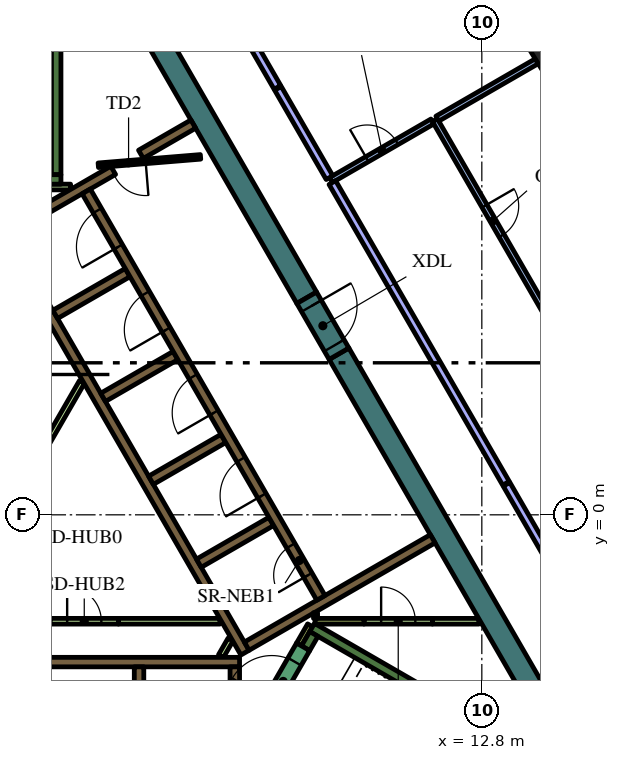
"""IFC4 building model, lengths in metres.
Left out: names, types, materials, properties, quantities, classifications, styles, units other than length and angle.
Written with IfcOpenShell. Run it as: python <this file> out.ifc"""

import sys

from ifc_helpers import new_model, si_unit, direction, frame, frame_2d, origin, origin_2d, place, context, subcontext, project, spatial, polyline, rectangle, outline, extrude, element, fill, save


model = new_model("IFC4")
c1 = context("Model", 3, precision=1e-05, world=origin(), true_north=direction((0.0, 1.0)))
c2 = subcontext(c1, "Body", "Model", "MODEL_VIEW")
j1 = project(units=[si_unit("LENGTHUNIT", "METRE"), si_unit("PLANEANGLEUNIT", "RADIAN")], contexts=[c1])
p1 = place(None, origin())
s1 = spatial("IfcSite", under=j1, at=p1, CompositionType="ELEMENT")
p2 = place(p1, origin())
s2 = spatial("IfcBuilding", under=s1, at=p2, CompositionType="ELEMENT")
p3 = place(p2, frame((0.0, 0.0, 288.0)))
s3 = spatial("IfcBuildingStorey", under=s2, at=p3, CompositionType="ELEMENT", Elevation=288.0)
p4 = place(p3, frame((14.556, 12.098, 0.0), z_axis=(0.0, 0.0, 1.0), x_axis=(-0.525609744083, 0.850725805959, 0.0)))
e1 = element("IfcColumn", 1, at=p4, inside=s3, PredefinedType="COLUMN", context=c2, shape_type="SweptSolid", body=[
    extrude(rectangle(XDim=1.0, YDim=0.7, at=origin_2d()), origin(), (0.0, 0.0, 1.0), 4.2),
])
for number, where, z_axis, x_axis in (
    (2, (9.042, 4.239, 0.0), (0.0, 0.0, 1.0), (0.5, -0.866, 0.0)),
    (3, (1.989, 16.456, 0.0), (0.0, 0.0, 1.0), (0.5, -0.866, 0.0)),
):
    element("IfcWall", number, at=place(p3, frame(where, z_axis=z_axis, x_axis=x_axis)), inside=s3, PredefinedType="SOLIDWALL", context=c2, shape_type="SweptSolid", body=[
        extrude(rectangle(XDim=12.406, YDim=0.6, at=frame_2d((6.203, 0.0))), origin(), (0.0, 0.0, 1.0), 4.2),
    ])
p5 = place(p3, frame((8.334, -2.964, 0.0), z_axis=(0.0, 0.0, 1.0), x_axis=(0.866016039709, -0.500016218704, 0.0)))
e4 = element("IfcWall", 4, at=p5, inside=s3, PredefinedType="SOLIDWALL", context=c2, shape_type="SweptSolid", body=[
    extrude(rectangle(XDim=7.05, YDim=0.25, at=frame_2d((3.525, 0.0))), origin(), (0.0, 0.0, 1.0), 4.2),
])
p6 = place(p3, frame((8.163, -3.511, 0.0), z_axis=(0.0, 0.0, 1.0), x_axis=(0.500127794843, 0.865951608824, 0.0)))
e5 = element("IfcWall", 5, at=p6, inside=s3, PredefinedType="SOLIDWALL", context=c2, shape_type="SweptSolid", body=[
    extrude(rectangle(XDim=0.435, YDim=0.25, at=frame_2d((0.217, 0.0))), origin(), (0.0, 0.0, 1.0), 4.2),
])
p7 = place(p3, frame((1.6, 8.95, 0.0), z_axis=(0.0, 0.0, 1.0), x_axis=(0.0, 1.0, 0.0)))
e6 = element("IfcWall", 6, at=p7, inside=s3, PredefinedType="SOLIDWALL", context=c2, shape_type="SweptSolid", body=[
    extrude(rectangle(XDim=6.8, YDim=0.25, at=frame_2d((3.4, 0.0))), origin(), (0.0, 0.0, 1.0), 4.2),
])
p8 = place(p3, frame((1.05, 8.825, 0.0), z_axis=(0.0, 0.0, 1.0), x_axis=(1.0, 0.0, 0.0)))
e7 = element("IfcWall", 7, at=p8, inside=s3, PredefinedType="SOLIDWALL", context=c2, shape_type="SweptSolid", body=[
    extrude(rectangle(XDim=0.675, YDim=0.25, at=frame_2d((0.337, 0.0))), origin(), (0.0, 0.0, 1.0), 4.2),
])
p9 = place(p3, frame((-5.806, -3.875, 0.0), z_axis=(0.0, 0.0, 1.0), x_axis=(1.0, 0.0, 0.0)))
e8 = element("IfcWall", 8, at=p9, inside=s3, PredefinedType="SOLIDWALL", context=c2, shape_type="SweptSolid", body=[
    extrude(rectangle(XDim=12.231, YDim=0.25, at=frame_2d((6.116, 0.0))), origin(), (0.0, 0.0, 1.0), 4.2),
])
p10 = place(p3, frame((6.3, -7.24, 0.0), z_axis=(0.0, 0.0, 1.0), x_axis=(0.0, 1.0, 0.0)))
e9 = element("IfcWall", 9, at=p10, inside=s3, PredefinedType="SOLIDWALL", context=c2, shape_type="SweptSolid", body=[
    extrude(rectangle(XDim=3.24, YDim=0.25, at=frame_2d((1.62, 0.0))), origin(), (0.0, 0.0, 1.0), 4.2),
])
p11 = place(p3, frame((3.78, -4.0, 0.0), z_axis=(0.0, 0.0, 1.0), x_axis=(0.0, -1.0, 0.0)))
e10 = element("IfcWall", 10, at=p11, inside=s3, PredefinedType="SOLIDWALL", context=c2, shape_type="SweptSolid", body=[
    extrude(rectangle(XDim=2.2, YDim=0.25, at=frame_2d((1.1, 0.0))), origin(), (0.0, 0.0, 1.0), 4.2),
])
p12 = place(p3, origin())
e11 = element("IfcWall", 11, at=p12, inside=s3, PredefinedType="SOLIDWALL", context=c2, shape_type="SweptSolid", body=[
    extrude(outline(polyline([(0.332, 6.925), (0.335, 6.925), (0.335, 6.925), (0.335, 6.925), (0.335, 7.075), (0.335, 7.075), (0.335, 7.075), (0.245, 7.075), (0.035, 7.439), (0.252, 7.564), (0.377, 7.348), (1.512, 5.382), (1.637, 5.165), (2.221, 4.153), (2.771, 3.199), (2.896, 2.983), (3.138, 2.564), (4.031, 1.017), (4.156, 0.801), (5.292, -1.165), (5.417, -1.382), (6.073, -2.519), (6.552, -3.348), (6.677, -3.564), (6.46, -3.689), (0.332, 6.925)])), origin(), (0.0, 0.0, 1.0), 4.2),
])
p13 = place(p3, frame((3.1, 9.064, 0.0), z_axis=(0.0, 0.0, 1.0), x_axis=(-0.866030133475, -0.499991807846, 0.0)))
e12 = element("IfcWall", 12, at=p13, inside=s3, PredefinedType="SOLIDWALL", context=c2, shape_type="SweptSolid", body=[
    extrude(rectangle(XDim=3.217, YDim=0.25, at=frame_2d((1.608, 0.0))), origin(), (0.0, 0.0, 1.0), 4.2),
])
p14 = place(p3, frame((1.574, 5.274, 0.0), z_axis=(0.0, 0.0, 1.0), x_axis=(0.866028486751, 0.499994660107, 0.0)))
e13 = element("IfcWall", 13, at=p14, inside=s3, PredefinedType="SOLIDWALL", context=c2, shape_type="SweptSolid", body=[
    extrude(rectangle(XDim=2.2, YDim=0.25, at=frame_2d((1.1, 0.0))), origin(), (0.0, 0.0, 1.0), 4.2),
])
for number, where, z_axis, x_axis in (
    (14, (2.834, 3.091, 0.0), (0.0, 0.0, 1.0), (0.866, 0.5, 0.0)),
    (15, (4.094, 0.909, 0.0), (0.0, 0.0, 1.0), (0.866, 0.5, 0.0)),
    (16, (5.354, -1.274, 0.0), (0.0, 0.0, 1.0), (0.866, 0.5, 0.0)),
):
    element("IfcWall", number, at=place(p3, frame(where, z_axis=z_axis, x_axis=x_axis)), inside=s3, PredefinedType="SOLIDWALL", context=c2, shape_type="SweptSolid", body=[
        extrude(rectangle(XDim=2.2, YDim=0.25, at=frame_2d((1.1, 0.0))), origin(), (0.0, 0.0, 1.0), 4.2),
    ])
p15 = place(p3, frame((11.507, -0.631, 0.0), z_axis=(0.0, 0.0, 1.0), x_axis=(-0.866011447264, -0.500024172624, 0.0)))
e17 = element("IfcWall", 17, at=p15, inside=s3, PredefinedType="SOLIDWALL", context=c2, shape_type="SweptSolid", body=[
    extrude(rectangle(XDim=5.65, YDim=0.25, at=frame_2d((2.825, 0.0))), origin(), (0.0, 0.0, 1.0), 4.2),
])
p16 = place(p3, frame((3.83, 9.486, 0.0), z_axis=(0.0, 0.0, 1.0), x_axis=(0.865986202621, 0.500067892261, 0.0)))
e18 = element("IfcWall", 18, at=p16, inside=s3, PredefinedType="SOLIDWALL", context=c2, shape_type="SweptSolid", body=[
    extrude(rectangle(XDim=1.591, YDim=0.25, at=frame_2d((0.795, 0.0))), origin(), (0.0, 0.0, 1.0), 4.2),
])
for number, where, z_axis, x_axis in (
    (19, (0.941, 1.179, 0.0), (0.0, 0.0, 1.0), (0.5, 0.866, 0.0)),
    (20, (3.238, -2.8, 0.0), (0.0, 0.0, 1.0), (1.0, 0.0, 0.0)),
):
    element("IfcWall", number, at=place(p3, frame(where, z_axis=z_axis, x_axis=x_axis)), inside=s3, PredefinedType="PARTITIONING", context=c2, shape_type="SweptSolid", body=[
        extrude(rectangle(XDim=2.672, YDim=0.15, at=frame_2d((1.336, 0.0))), origin(), (0.0, 0.0, 1.0), 3.55),
    ])
p17 = place(p3, frame((1.05, 8.625, 0.0), z_axis=(0.0, 0.0, 1.0), x_axis=(1.0, 0.0, 0.0)))
e21 = element("IfcWall", 21, at=p17, inside=s3, PredefinedType="PARTITIONING", context=c2, shape_type="SweptSolid", body=[
    extrude(rectangle(XDim=0.929, YDim=0.15, at=frame_2d((0.464, 0.0))), origin(), (0.0, 0.0, 1.0), 3.55),
])
p18 = place(p3, frame((8.412, -2.8, 0.0), z_axis=(0.0, 0.0, 1.0), x_axis=(1.0, 0.0, 0.0)))
e22 = element("IfcWall", 22, at=p18, inside=s3, PredefinedType="PARTITIONING", context=c2, shape_type="SweptSolid", body=[
    extrude(rectangle(XDim=1.288, YDim=0.15, at=frame_2d((0.644, 0.0))), origin(), (0.0, 0.0, 1.0), 4.2),
])
p19 = place(p3, frame((8.37, -2.65, 0.0), z_axis=(0.0, 0.0, 1.0), x_axis=(1.0, 0.0, 0.0)))
e23 = element("IfcWall", 23, at=p19, inside=s3, PredefinedType="PARTITIONING", context=c2, shape_type="SweptSolid", body=[
    extrude(rectangle(XDim=0.108, YDim=0.15, at=frame_2d((0.054, 0.0))), origin(), (0.0, 0.0, 1.0), 4.2),
])
p20 = place(p3, frame((8.281, -2.907, 0.0), z_axis=(0.0, 0.0, 1.0), x_axis=(-0.500193841991, -0.86591346013, 0.0)))
e24 = element("IfcWall", 24, at=p20, inside=s3, PredefinedType="PARTITIONING", context=c2, shape_type="SweptSolid", body=[
    extrude(rectangle(XDim=0.583, YDim=0.15, at=frame_2d((0.292, 0.0))), origin(), (0.0, 0.0, 1.0), 4.2),
])
p21 = place(p3, frame((11.5, -2.801, 0.0), z_axis=(0.0, 0.0, 1.0), x_axis=(1.0, 0.0, 0.0)))
e25 = element("IfcWall", 25, at=p21, inside=s3, PredefinedType="PARTITIONING", context=c2, shape_type="SweptSolid", body=[
    extrude(rectangle(XDim=1.222, YDim=0.15, at=frame_2d((0.611, 0.0))), origin(), (0.0, 0.0, 1.0), 3.55),
])
p22 = place(p3, frame((5.936, -3.718, 0.0), z_axis=(0.0, 0.0, 1.0), x_axis=(0.499890179513, 0.866088799389, 0.0)))
e26 = element("IfcWall", 26, at=p22, inside=s3, PredefinedType="PARTITIONING", context=c2, shape_type="SweptSolid", body=[
    extrude(rectangle(XDim=0.504, YDim=0.15, at=frame_2d((0.252, 0.0))), origin(), (0.0, 0.0, 1.0), 3.55),
])
p23 = place(p3, frame((8.565, -2.185, 0.0), z_axis=(0.0, 0.0, 1.0), x_axis=(-0.499997954832, 0.866026584559, 0.0)))
e27 = element("IfcWall", 27, at=p23, inside=s3, PredefinedType="SOLIDWALL", context=c2, shape_type="SweptSolid", body=[
    extrude(rectangle(XDim=12.35, YDim=0.25, at=frame_2d((6.175, 0.0))), origin(), (0.0, 0.0, 1.0), 4.2),
])
p24 = place(p23, frame((0.685, 0.0, 0.0)))
e28 = element("IfcOpeningElement", 28, at=p24, cuts=e27, PredefinedType="OPENING", context=c2, shape_type="SweptSolid", body=[
    extrude(rectangle(XDim=0.9, YDim=2.1, at=frame_2d((0.45, 1.05))), frame((0.0, 0.135, 0.0), z_axis=(0.0, -1.0, 0.0), x_axis=(1.0, 0.0, 0.0)), (0.0, 0.0, 1.0), 0.27),
])
p25 = place(p23, frame((3.105, 0.0, 0.0)))
e29 = element("IfcOpeningElement", 29, at=p25, cuts=e27, PredefinedType="OPENING", context=c2, shape_type="SweptSolid", body=[
    extrude(rectangle(XDim=1.1, YDim=2.1, at=frame_2d((0.55, 1.05))), frame((0.0, 0.135, 0.0), z_axis=(0.0, -1.0, 0.0), x_axis=(1.0, 0.0, 0.0)), (0.0, 0.0, 1.0), 0.27),
])
p26 = place(p23, frame((5.625, 0.0, 0.0)))
e30 = element("IfcOpeningElement", 30, at=p26, cuts=e27, PredefinedType="OPENING", context=c2, shape_type="SweptSolid", body=[
    extrude(rectangle(XDim=1.1, YDim=2.1, at=frame_2d((0.55, 1.05))), frame((0.0, 0.135, 0.0), z_axis=(0.0, -1.0, 0.0), x_axis=(1.0, 0.0, 0.0)), (0.0, 0.0, 1.0), 0.27),
])
p27 = place(p23, frame((8.145, 0.0, 0.0)))
e31 = element("IfcOpeningElement", 31, at=p27, cuts=e27, PredefinedType="OPENING", context=c2, shape_type="SweptSolid", body=[
    extrude(rectangle(XDim=1.1, YDim=2.1, at=frame_2d((0.55, 1.05))), frame((0.0, 0.135, 0.0), z_axis=(0.0, -1.0, 0.0), x_axis=(1.0, 0.0, 0.0)), (0.0, 0.0, 1.0), 0.27),
])
p28 = place(p23, frame((10.665, 0.0, 0.0)))
e32 = element("IfcOpeningElement", 32, at=p28, cuts=e27, PredefinedType="OPENING", context=c2, shape_type="SweptSolid", body=[
    extrude(rectangle(XDim=1.1, YDim=2.1, at=frame_2d((0.55, 1.05))), frame((0.0, 0.135, 0.0), z_axis=(0.0, -1.0, 0.0), x_axis=(1.0, 0.0, 0.0)), (0.0, 0.0, 1.0), 0.27),
])
p29 = place(p3, frame((7.048, -5.292, 0.0), z_axis=(0.0, 0.0, 1.0), x_axis=(0.49994051562, 0.866059744384, 0.0)))
e33 = element("IfcWall", 33, at=p29, inside=s3, PredefinedType="SOLIDWALL", context=c2, shape_type="SweptSolid", body=[
    extrude(rectangle(XDim=2.1, YDim=0.4, at=frame_2d((1.05, 0.0))), origin(), (0.0, 0.0, 1.0), 4.2),
])
p30 = place(p29, frame((0.45, 0.0, 0.0)))
e34 = element("IfcOpeningElement", 34, at=p30, cuts=e33, PredefinedType="OPENING", context=c2, shape_type="SweptSolid", body=[
    extrude(rectangle(XDim=1.2, YDim=2.1, at=frame_2d((0.6, 1.05))), frame((0.0, 0.21, 0.0), z_axis=(0.0, -1.0, 0.0), x_axis=(1.0, 0.0, 0.0)), (0.0, 0.0, 1.0), 0.42),
])
p31 = place(p3, frame((5.398, 9.419, 0.0), z_axis=(0.0, 0.0, 1.0), x_axis=(-0.996653416376, -0.081743303248, 0.0)))
e35 = element("IfcWall", 35, at=p31, inside=s3, PredefinedType="PARTITIONING", context=c2, shape_type="SweptSolid", body=[
    extrude(rectangle(XDim=2.7, YDim=0.12, at=frame_2d((1.35, 0.0))), origin(), (0.0, 0.0, 1.0), 3.55),
])
p32 = place(p31, frame((1.45, 0.0, 0.0)))
e36 = element("IfcOpeningElement", 36, at=p32, cuts=e35, PredefinedType="OPENING", context=c2, shape_type="SweptSolid", body=[
    extrude(rectangle(XDim=0.9, YDim=2.1, at=frame_2d((0.45, 1.05))), frame((0.0, 0.07, 0.0), z_axis=(0.0, -1.0, 0.0), x_axis=(1.0, 0.0, 0.0)), (0.0, 0.0, 1.0), 0.14),
])
p33 = place(p3, frame((8.192, 5.711, 0.0), z_axis=(0.0, 0.0, 1.0), x_axis=(0.500062241894, -0.865989465428, 0.0)))
e37 = element("IfcWall", 37, at=p33, inside=s3, PredefinedType="SOLIDWALL", context=c2, shape_type="SweptSolid", body=[
    extrude(rectangle(XDim=1.7, YDim=0.6, at=frame_2d((0.85, 0.0))), origin(), (0.0, 0.0, 1.0), 4.2),
])
p34 = place(p33, frame((0.25, 0.0, 0.0)))
e38 = element("IfcOpeningElement", 38, at=p34, cuts=e37, PredefinedType="OPENING", context=c2, shape_type="SweptSolid", body=[
    extrude(rectangle(XDim=1.2, YDim=2.1, at=frame_2d((0.6, 1.05))), frame((0.0, 0.31, 0.0), z_axis=(0.0, -1.0, 0.0), x_axis=(1.0, 0.0, 0.0)), (0.0, 0.0, 1.0), 0.62),
])
p35 = place(p3, frame((1.438, -2.8, 0.0), z_axis=(0.0, 0.0, 1.0), x_axis=(1.0, 0.0, 0.0)))
e39 = element("IfcWall", 39, at=p35, inside=s3, PredefinedType="PARTITIONING", context=c2, shape_type="SweptSolid", body=[
    extrude(rectangle(XDim=1.8, YDim=0.15, at=frame_2d((0.9, 0.0))), origin(), (0.0, 0.0, 1.0), 3.55),
])
p36 = place(p35, frame((0.45, 0.0, 0.0)))
e40 = element("IfcOpeningElement", 40, at=p36, cuts=e39, PredefinedType="OPENING", context=c2, shape_type="SweptSolid", body=[
    extrude(rectangle(XDim=0.9, YDim=2.1, at=frame_2d((0.45, 1.05))), frame((0.0, 0.085, 0.0), z_axis=(0.0, -1.0, 0.0), x_axis=(1.0, 0.0, 0.0)), (0.0, 0.0, 1.0), 0.17),
])
p37 = place(p3, frame((9.7, -2.8, 0.0), z_axis=(0.0, 0.0, 1.0), x_axis=(1.0, 0.0, 0.0)))
e41 = element("IfcWall", 41, at=p37, inside=s3, PredefinedType="PARTITIONING", context=c2, shape_type="SweptSolid", body=[
    extrude(rectangle(XDim=1.8, YDim=0.15, at=frame_2d((0.9, 0.0))), origin(), (0.0, 0.0, 1.0), 3.55),
])
p38 = place(p37, frame((0.45, 0.0, 0.0)))
e42 = element("IfcOpeningElement", 42, at=p38, cuts=e41, PredefinedType="OPENING", context=c2, shape_type="SweptSolid", body=[
    extrude(rectangle(XDim=0.9, YDim=2.1, at=frame_2d((0.45, 1.05))), frame((0.0, 0.085, 0.0), z_axis=(0.0, -1.0, 0.0), x_axis=(1.0, 0.0, 0.0)), (0.0, 0.0, 1.0), 0.17),
])
p39 = place(p3, frame((11.564, 10.387, 0.0), z_axis=(0.0, 0.0, 1.0), x_axis=(0.500002559113, -0.866023926275, 0.0)))
e43 = element("IfcWall", 43, at=p39, inside=s3, PredefinedType="PARTITIONING", context=c2, shape_type="SweptSolid", body=[
    extrude(rectangle(XDim=6.212, YDim=0.15, at=frame_2d((3.106, 0.0))), origin(), (0.0, 0.0, 1.0), 3.55),
])
p40 = place(p39, frame((2.612, 0.0, 0.0)))
e44 = element("IfcOpeningElement", 44, at=p40, cuts=e43, PredefinedType="OPENING", context=c2, shape_type="SweptSolid", body=[
    extrude(rectangle(XDim=0.9, YDim=2.1, at=frame_2d((0.45, 1.05))), frame((0.0, 0.085, 0.0), z_axis=(0.0, -1.0, 0.0), x_axis=(1.0, 0.0, 0.0)), (0.0, 0.0, 1.0), 0.17),
])
p41 = place(p3, frame((11.629, 10.424, 0.0), z_axis=(0.0, 0.0, 1.0), x_axis=(0.866061796884, 0.499936960004, 0.0)))
e45 = element("IfcWall", 45, at=p41, inside=s3, PredefinedType="PARTITIONING", context=c2, shape_type="SweptSolid", body=[
    extrude(rectangle(XDim=3.021, YDim=0.15, at=frame_2d((1.511, 0.0))), origin(), (0.0, 0.0, 1.0), 3.55),
])
p42 = place(p3, frame((8.829, 8.808, 0.0), z_axis=(0.0, 0.0, 1.0), x_axis=(0.866041857893, 0.499971499565, 0.0)))
e46 = element("IfcWall", 46, at=p42, inside=s3, PredefinedType="PARTITIONING", context=c2, shape_type="SweptSolid", body=[
    extrude(rectangle(XDim=3.083, YDim=0.15, at=frame_2d((1.542, 0.0))), origin(), (0.0, 0.0, 1.0), 3.55),
])
p43 = place(p42, frame((1.1, 0.0, 0.0)))
e47 = element("IfcOpeningElement", 47, at=p43, cuts=e46, PredefinedType="OPENING", context=c2, shape_type="SweptSolid", body=[
    extrude(rectangle(XDim=0.9, YDim=2.1, at=frame_2d((0.45, 1.05))), frame((0.0, 0.085, 0.0), z_axis=(0.0, -1.0, 0.0), x_axis=(1.0, 0.0, 0.0)), (0.0, 0.0, 1.0), 0.17),
])
p44 = place(p3, frame((13.436, 0.829, 0.0), z_axis=(0.0, 0.0, 1.0), x_axis=(-0.499983789798, 0.866034762547, 0.0)))
e48 = element("IfcWall", 48, at=p44, inside=s3, PredefinedType="PARTITIONING", context=c2, shape_type="SweptSolid", body=[
    extrude(rectangle(XDim=9.138, YDim=0.2, at=frame_2d((4.569, 0.0))), origin(), (0.0, 0.0, 1.0), 3.55),
])
p45 = place(p3, frame((17.565, -6.324, 0.0), z_axis=(0.0, 0.0, 1.0), x_axis=(-0.499977548053, 0.866038366034, 0.0)))
e49 = element("IfcWall", 49, at=p45, inside=s3, PredefinedType="PARTITIONING", context=c2, shape_type="SweptSolid", body=[
    extrude(rectangle(XDim=8.229, YDim=0.2, at=frame_2d((4.115, 0.0))), origin(), (0.0, 0.0, 1.0), 3.55),
])
p46 = place(p3, frame((8.792, 8.873, 0.0), z_axis=(0.0, 0.0, 1.0), x_axis=(-0.499992600721, 0.866029675718, 0.0)))
e50 = element("IfcWall", 50, at=p46, inside=s3, PredefinedType="PARTITIONING", context=c2, shape_type="SweptSolid", body=[
    extrude(rectangle(XDim=2.712, YDim=0.2, at=frame_2d((1.356, 0.0))), origin(), (0.0, 0.0, 1.0), 3.55),
])
p47 = place(p3, frame((7.421, 11.247, 0.0), z_axis=(0.0, 0.0, 1.0), x_axis=(-0.499999024953, 0.866025966727, 0.0)))
e51 = element("IfcWall", 51, at=p47, inside=s3, PredefinedType="PARTITIONING", context=c2, shape_type="SweptSolid", body=[
    extrude(rectangle(XDim=7.769, YDim=0.2, at=frame_2d((3.884, 0.0))), origin(), (0.0, 0.0, 1.0), 3.55),
])
p48 = place(p24, origin())
e52 = element("IfcDoor", 52, at=p48, inside=s3, OperationType="SINGLE_SWING_LEFT", PredefinedType="DOOR", context=c2, shape_type="SweptSolid", body=[
    extrude(rectangle(XDim=0.9, YDim=2.1, at=frame_2d((0.45, 1.05))), frame((0.0, 0.025, 0.0), z_axis=(0.0, -1.0, 0.0), x_axis=(1.0, 0.0, 0.0)), (0.0, 0.0, 1.0), 0.05),
])
fill(e28, e52)
p49 = place(p25, origin())
e53 = element("IfcDoor", 53, at=p49, inside=s3, OperationType="DOUBLE_DOOR_SLIDING", PredefinedType="DOOR", context=c2, shape_type="SweptSolid", body=[
    extrude(rectangle(XDim=1.1, YDim=2.1, at=frame_2d((0.55, 1.05))), frame((0.0, 0.025, 0.0), z_axis=(0.0, -1.0, 0.0), x_axis=(1.0, 0.0, 0.0)), (0.0, 0.0, 1.0), 0.05),
])
fill(e29, e53)
p50 = place(p26, origin())
e54 = element("IfcDoor", 54, at=p50, inside=s3, OperationType="DOUBLE_DOOR_SLIDING", PredefinedType="DOOR", context=c2, shape_type="SweptSolid", body=[
    extrude(rectangle(XDim=1.1, YDim=2.1, at=frame_2d((0.55, 1.05))), frame((0.0, 0.025, 0.0), z_axis=(0.0, -1.0, 0.0), x_axis=(1.0, 0.0, 0.0)), (0.0, 0.0, 1.0), 0.05),
])
fill(e30, e54)
p51 = place(p27, origin())
e55 = element("IfcDoor", 55, at=p51, inside=s3, OperationType="DOUBLE_DOOR_SLIDING", PredefinedType="DOOR", context=c2, shape_type="SweptSolid", body=[
    extrude(rectangle(XDim=1.1, YDim=2.1, at=frame_2d((0.55, 1.05))), frame((0.0, 0.025, 0.0), z_axis=(0.0, -1.0, 0.0), x_axis=(1.0, 0.0, 0.0)), (0.0, 0.0, 1.0), 0.05),
])
fill(e31, e55)
p52 = place(p28, origin())
e56 = element("IfcDoor", 56, at=p52, inside=s3, OperationType="DOUBLE_DOOR_SLIDING", PredefinedType="DOOR", context=c2, shape_type="SweptSolid", body=[
    extrude(rectangle(XDim=1.1, YDim=2.1, at=frame_2d((0.55, 1.05))), frame((0.0, 0.025, 0.0), z_axis=(0.0, -1.0, 0.0), x_axis=(1.0, 0.0, 0.0)), (0.0, 0.0, 1.0), 0.05),
])
fill(e32, e56)
p53 = place(p30, origin())
e57 = element("IfcDoor", 57, at=p53, inside=s3, OperationType="SINGLE_SWING_LEFT", PredefinedType="DOOR", context=c2, shape_type="SweptSolid", body=[
    extrude(rectangle(XDim=1.2, YDim=2.1, at=frame_2d((0.6, 1.05))), frame((0.0, 0.025, 0.0), z_axis=(0.0, -1.0, 0.0), x_axis=(1.0, 0.0, 0.0)), (0.0, 0.0, 1.0), 0.05),
])
fill(e34, e57)
p54 = place(p32, origin())
e58 = element("IfcDoor", 58, at=p54, inside=s3, OperationType="SINGLE_SWING_LEFT", PredefinedType="DOOR", context=c2, shape_type="SweptSolid", body=[
    extrude(rectangle(XDim=0.9, YDim=2.1, at=frame_2d((0.45, 1.05))), frame((0.0, 0.025, 0.0), z_axis=(0.0, -1.0, 0.0), x_axis=(1.0, 0.0, 0.0)), (0.0, 0.0, 1.0), 0.05),
])
fill(e36, e58)
p55 = place(p34, origin())
e59 = element("IfcDoor", 59, at=p55, inside=s3, OperationType="SINGLE_SWING_LEFT", PredefinedType="DOOR", context=c2, shape_type="SweptSolid", body=[
    extrude(rectangle(XDim=1.2, YDim=2.1, at=frame_2d((0.6, 1.05))), frame((0.0, 0.025, 0.0), z_axis=(0.0, -1.0, 0.0), x_axis=(1.0, 0.0, 0.0)), (0.0, 0.0, 1.0), 0.05),
])
fill(e38, e59)
p56 = place(p36, origin())
e60 = element("IfcDoor", 60, at=p56, inside=s3, OperationType="SINGLE_SWING_LEFT", PredefinedType="DOOR", context=c2, shape_type="SweptSolid", body=[
    extrude(rectangle(XDim=0.9, YDim=2.1, at=frame_2d((0.45, 1.05))), frame((0.0, 0.025, 0.0), z_axis=(0.0, -1.0, 0.0), x_axis=(1.0, 0.0, 0.0)), (0.0, 0.0, 1.0), 0.05),
])
fill(e40, e60)
p57 = place(p38, origin())
e61 = element("IfcDoor", 61, at=p57, inside=s3, OperationType="SINGLE_SWING_LEFT", PredefinedType="DOOR", context=c2, shape_type="SweptSolid", body=[
    extrude(rectangle(XDim=0.9, YDim=2.1, at=frame_2d((0.45, 1.05))), frame((0.0, 0.025, 0.0), z_axis=(0.0, -1.0, 0.0), x_axis=(1.0, 0.0, 0.0)), (0.0, 0.0, 1.0), 0.05),
])
fill(e42, e61)
p58 = place(p40, origin())
e62 = element("IfcDoor", 62, at=p58, inside=s3, OperationType="SINGLE_SWING_LEFT", PredefinedType="DOOR", context=c2, shape_type="SweptSolid", body=[
    extrude(rectangle(XDim=0.9, YDim=2.1, at=frame_2d((0.45, 1.05))), frame((0.0, 0.025, 0.0), z_axis=(0.0, -1.0, 0.0), x_axis=(1.0, 0.0, 0.0)), (0.0, 0.0, 1.0), 0.05),
])
fill(e44, e62)
p59 = place(p43, origin())
e63 = element("IfcDoor", 63, at=p59, inside=s3, OperationType="SINGLE_SWING_RIGHT", PredefinedType="DOOR", context=c2, shape_type="SweptSolid", body=[
    extrude(rectangle(XDim=0.9, YDim=2.1, at=frame_2d((0.45, 1.05))), frame((0.0, 0.025, 0.0), z_axis=(0.0, -1.0, 0.0), x_axis=(1.0, 0.0, 0.0)), (0.0, 0.0, 1.0), 0.05),
])
fill(e47, e63)
save(model, sys.argv[1])
